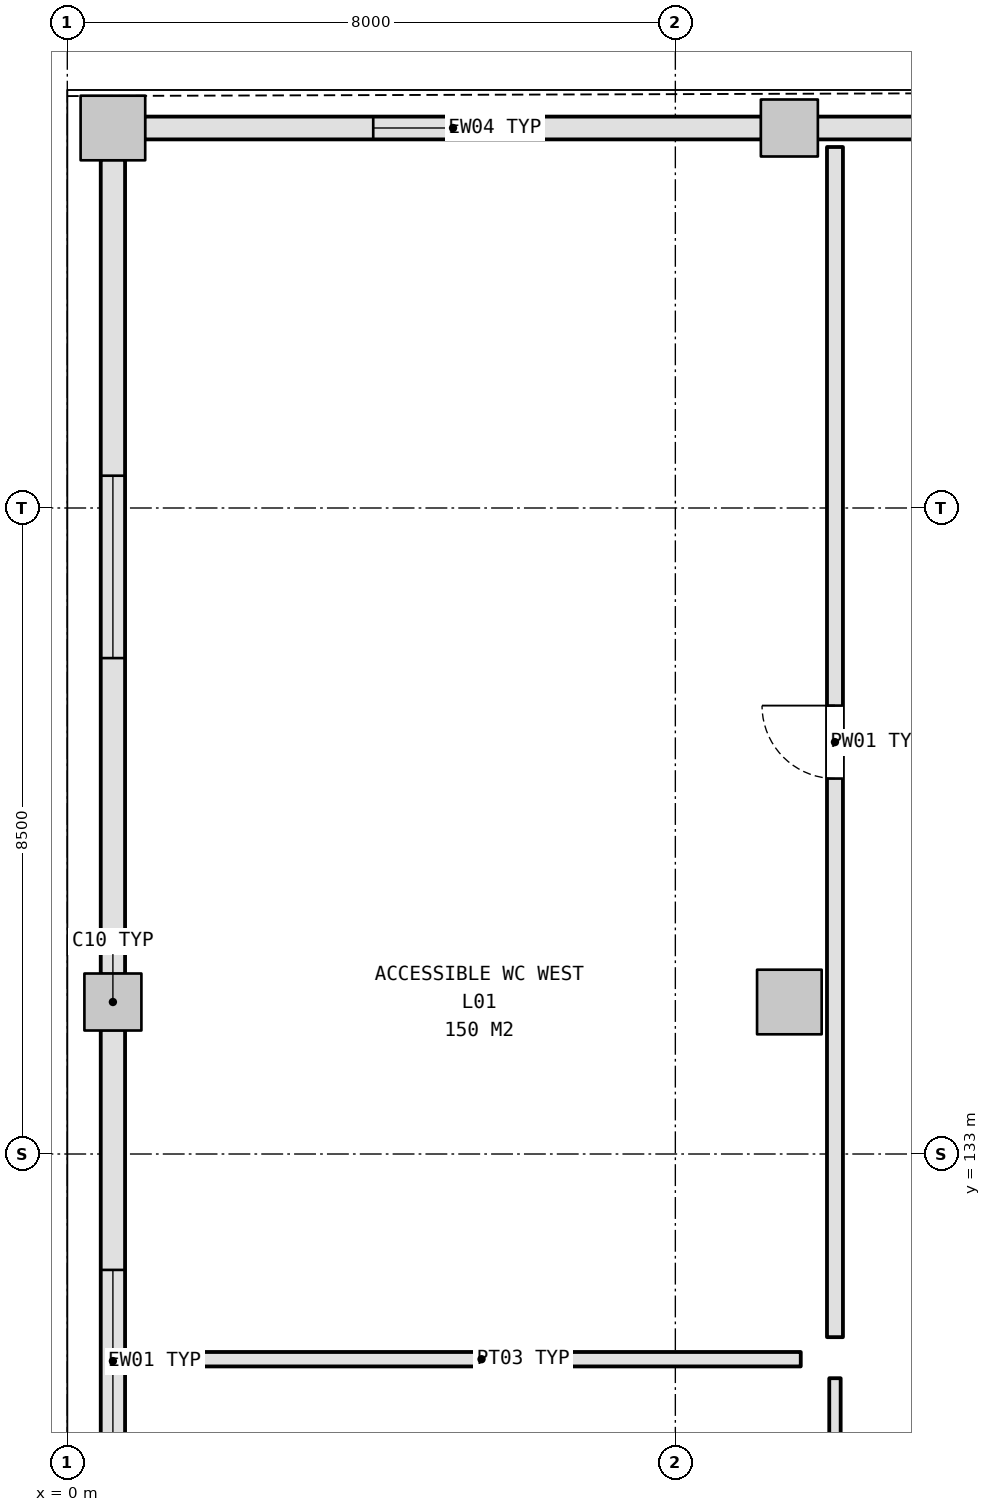
"""IFC4 building model, lengths in metres.
Left out: names, types, materials, properties, quantities, classifications, styles, units other than length and angle.
Written with IfcOpenShell. Run it as: python <this file> out.ifc"""

import sys

from ifc_helpers import new_model, si_unit, direction, frame, frame_2d, origin, origin_2d, place, context, subcontext, project, spatial, rectangle, extrude, element, fill, save


model = new_model("IFC4")
c1 = context("Model", 3, precision=1e-05, world=origin(), true_north=direction((0.0, 1.0)))
c2 = subcontext(c1, "Body", "Model", "MODEL_VIEW")
j1 = project(units=[si_unit("LENGTHUNIT", "METRE"), si_unit("PLANEANGLEUNIT", "RADIAN")], contexts=[c1])
p1 = place(None, origin())
s1 = spatial("IfcSite", under=j1, at=p1, CompositionType="ELEMENT")
p2 = place(p1, origin())
s2 = spatial("IfcBuilding", under=s1, at=p2, CompositionType="ELEMENT")
p3 = place(p2, frame((0.0, 0.0, 5.4)))
s3 = spatial("IfcBuildingStorey", under=s2, at=p3, CompositionType="ELEMENT", Elevation=5.4)
p4 = place(p3, frame((0.6, 135.0, 0.0), z_axis=(0.0, 0.0, 1.0), x_axis=(1.0, 0.0, 0.0)))
e1 = element("IfcColumn", 1, at=p4, inside=s3, PredefinedType="COLUMN", context=c2, shape_type="SweptSolid", body=[
    extrude(rectangle(XDim=0.75, YDim=0.75, at=origin_2d()), origin(), (0.0, 0.0, 1.0), 5.4),
])
for number, where, z_axis, x_axis in (
    (2, (0.6, 146.5, 0.0), (0.0, 0.0, 1.0), (1.0, 0.0, 0.0)),
    (3, (9.5, 135.0, 0.0), (0.0, 0.0, 1.0), (1.0, 0.0, 0.0)),
):
    element("IfcColumn", number, at=place(p3, frame(where, z_axis=z_axis, x_axis=x_axis)), inside=s3, PredefinedType="COLUMN", context=c2, shape_type="SweptSolid", body=[
        extrude(rectangle(XDim=0.85, YDim=0.85, at=origin_2d()), origin(), (0.0, 0.0, 1.0), 5.4),
    ])
p5 = place(p3, frame((9.5, 146.5, 0.0), z_axis=(0.0, 0.0, 1.0), x_axis=(1.0, 0.0, 0.0)))
e4 = element("IfcColumn", 4, at=p5, inside=s3, PredefinedType="COLUMN", context=c2, shape_type="SweptSolid", body=[
    extrude(rectangle(XDim=0.75, YDim=0.75, at=origin_2d()), origin(), (0.0, 0.0, 1.0), 5.4),
])
p6 = place(p3, frame((0.6, 125.913, 0.0), z_axis=(0.0, 0.0, 1.0), x_axis=(0.0, 1.0, 0.0)))
e5 = element("IfcWall", 5, at=p6, inside=s3, PredefinedType="SOLIDWALL", context=c2, shape_type="SweptSolid", body=[
    extrude(rectangle(XDim=8.724, YDim=0.32, at=frame_2d((4.362, 0.0))), origin(), (0.0, 0.0, 1.0), 4.475),
])
p7 = place(p6, frame((3.162, 0.0, 1.05)))
e6 = element("IfcOpeningElement", 6, at=p7, cuts=e5, PredefinedType="OPENING", context=c2, shape_type="SweptSolid", body=[
    extrude(rectangle(XDim=2.4, YDim=2.1, at=frame_2d((1.2, 1.05))), frame((0.0, 0.17, 0.0), z_axis=(0.0, -1.0, 0.0), x_axis=(1.0, 0.0, 0.0)), (0.0, 0.0, 1.0), 0.34),
])
p8 = place(p3, frame((0.6, 135.363, 0.0), z_axis=(0.0, 0.0, 1.0), x_axis=(0.0, 1.0, 0.0)))
e7 = element("IfcWall", 7, at=p8, inside=s3, PredefinedType="SOLIDWALL", context=c2, shape_type="SweptSolid", body=[
    extrude(rectangle(XDim=10.724, YDim=0.32, at=frame_2d((5.362, 0.0))), origin(), (0.0, 0.0, 1.0), 4.475),
])
p9 = place(p8, frame((4.162, 0.0, 1.05)))
e8 = element("IfcOpeningElement", 8, at=p9, cuts=e7, PredefinedType="OPENING", context=c2, shape_type="SweptSolid", body=[
    extrude(rectangle(XDim=2.4, YDim=2.1, at=frame_2d((1.2, 1.05))), frame((0.0, 0.17, 0.0), z_axis=(0.0, -1.0, 0.0), x_axis=(1.0, 0.0, 0.0)), (0.0, 0.0, 1.0), 0.34),
])
p10 = place(p3, frame((1.013, 146.5, 0.0), z_axis=(0.0, 0.0, 1.0), x_axis=(1.0, 0.0, 0.0)))
e9 = element("IfcWall", 9, at=p10, inside=s3, PredefinedType="SOLIDWALL", context=c2, shape_type="SweptSolid", body=[
    extrude(rectangle(XDim=8.124, YDim=0.3, at=frame_2d((4.062, 0.0))), origin(), (0.0, 0.0, 1.0), 4.475),
])
p11 = place(p10, frame((3.012, 0.0, 1.05)))
e10 = element("IfcOpeningElement", 10, at=p11, cuts=e9, PredefinedType="OPENING", context=c2, shape_type="SweptSolid", body=[
    extrude(rectangle(XDim=2.1, YDim=2.1, at=frame_2d((1.05, 1.05))), frame((0.0, 0.16, 0.0), z_axis=(0.0, -1.0, 0.0), x_axis=(1.0, 0.0, 0.0)), (0.0, 0.0, 1.0), 0.32),
])
p12 = place(p3, frame((9.863, 146.5, 0.0), z_axis=(0.0, 0.0, 1.0), x_axis=(1.0, 0.0, 0.0)))
e11 = element("IfcWall", 11, at=p12, inside=s3, PredefinedType="SOLIDWALL", context=c2, shape_type="SweptSolid", body=[
    extrude(rectangle(XDim=8.124, YDim=0.3, at=frame_2d((4.062, 0.0))), origin(), (0.0, 0.0, 1.0), 4.475),
])
p13 = place(p12, frame((3.012, 0.0, 1.05)))
e12 = element("IfcOpeningElement", 12, at=p13, cuts=e11, PredefinedType="OPENING", context=c2, shape_type="SweptSolid", body=[
    extrude(rectangle(XDim=2.1, YDim=2.1, at=frame_2d((1.05, 1.05))), frame((0.0, 0.16, 0.0), z_axis=(0.0, -1.0, 0.0), x_axis=(1.0, 0.0, 0.0)), (0.0, 0.0, 1.0), 0.32),
])
p14 = place(p3, frame((10.1, 130.05, 0.0), z_axis=(0.0, 0.0, 1.0), x_axis=(0.0, -1.0, 0.0)))
e13 = element("IfcWall", 13, at=p14, inside=s3, PredefinedType="PARTITIONING", context=c2, shape_type="SweptSolid", body=[
    extrude(rectangle(XDim=8.3, YDim=0.15, at=frame_2d((4.15, 0.0))), origin(), (0.0, 0.0, 1.0), 4.668),
])
p15 = place(p14, frame((2.175, 0.0, 0.0)))
e14 = element("IfcOpeningElement", 14, at=p15, cuts=e13, PredefinedType="OPENING", context=c2, shape_type="SweptSolid", body=[
    extrude(rectangle(XDim=1.55, YDim=2.15, at=frame_2d((0.775, 1.075))), frame((0.0, 0.085, 0.0), z_axis=(0.0, -1.0, 0.0), x_axis=(1.0, 0.0, 0.0)), (0.0, 0.0, 1.0), 0.17),
])
p16 = place(p3, frame((1.25, 130.3, 0.0), z_axis=(0.0, 0.0, 1.0), x_axis=(1.0, 0.0, 0.0)))
e15 = element("IfcWall", 15, at=p16, inside=s3, PredefinedType="PARTITIONING", context=c2, shape_type="SweptSolid", body=[
    extrude(rectangle(XDim=8.4, YDim=0.19, at=frame_2d((4.2, 0.0))), origin(), (0.0, 0.0, 1.0), 4.475),
])
p17 = place(p3, frame((10.1, 146.25, 0.0), z_axis=(0.0, 0.0, 1.0), x_axis=(0.0, -1.0, 0.0)))
e16 = element("IfcWall", 16, at=p17, inside=s3, PredefinedType="PLUMBINGWALL", context=c2, shape_type="SweptSolid", body=[
    extrude(rectangle(XDim=15.66, YDim=0.21, at=frame_2d((7.83, 0.0))), origin(), (0.0, 0.0, 1.0), 4.668),
])
p18 = place(p17, frame((7.35, 0.0, 0.0)))
e17 = element("IfcOpeningElement", 17, at=p18, cuts=e16, PredefinedType="OPENING", context=c2, shape_type="SweptSolid", body=[
    extrude(rectangle(XDim=0.96, YDim=2.15, at=frame_2d((0.48, 1.075))), frame((0.0, 0.115, 0.0), z_axis=(0.0, -1.0, 0.0), x_axis=(1.0, 0.0, 0.0)), (0.0, 0.0, 1.0), 0.23),
])
p19 = place(p7, origin())
e18 = element("IfcWindow", 18, at=p19, inside=s3, PartitioningType="SINGLE_PANEL", PredefinedType="WINDOW", context=c2, shape_type="SweptSolid", body=[
    extrude(rectangle(XDim=2.4, YDim=2.1, at=frame_2d((1.2, 1.05))), frame((0.0, 0.03, 0.0), z_axis=(0.0, -1.0, 0.0), x_axis=(1.0, 0.0, 0.0)), (0.0, 0.0, 1.0), 0.06),
])
fill(e6, e18)
p20 = place(p9, origin())
e19 = element("IfcWindow", 19, at=p20, inside=s3, PartitioningType="SINGLE_PANEL", PredefinedType="WINDOW", context=c2, shape_type="SweptSolid", body=[
    extrude(rectangle(XDim=2.4, YDim=2.1, at=frame_2d((1.2, 1.05))), frame((0.0, 0.03, 0.0), z_axis=(0.0, -1.0, 0.0), x_axis=(1.0, 0.0, 0.0)), (0.0, 0.0, 1.0), 0.06),
])
fill(e8, e19)
p21 = place(p11, origin())
e20 = element("IfcWindow", 20, at=p21, inside=s3, PartitioningType="SINGLE_PANEL", PredefinedType="WINDOW", context=c2, shape_type="SweptSolid", body=[
    extrude(rectangle(XDim=2.1, YDim=2.1, at=frame_2d((1.05, 1.05))), frame((0.0, 0.03, 0.0), z_axis=(0.0, -1.0, 0.0), x_axis=(1.0, 0.0, 0.0)), (0.0, 0.0, 1.0), 0.06),
])
fill(e10, e20)
p22 = place(p18, frame((0.96, 0.0, 0.0), z_axis=(0.0, 0.0, 1.0), x_axis=(-1.0, 0.0, 0.0)))
e21 = element("IfcDoor", 21, at=p22, inside=s3, OperationType="SINGLE_SWING_LEFT", PredefinedType="DOOR", context=c2, shape_type="SweptSolid", body=[
    extrude(rectangle(XDim=0.96, YDim=2.15, at=frame_2d((0.48, 1.075))), frame((0.0, 0.025, 0.0), z_axis=(0.0, -1.0, 0.0), x_axis=(1.0, 0.0, 0.0)), (0.0, 0.0, 1.0), 0.05),
])
fill(e17, e21)
save(model, sys.argv[1])
